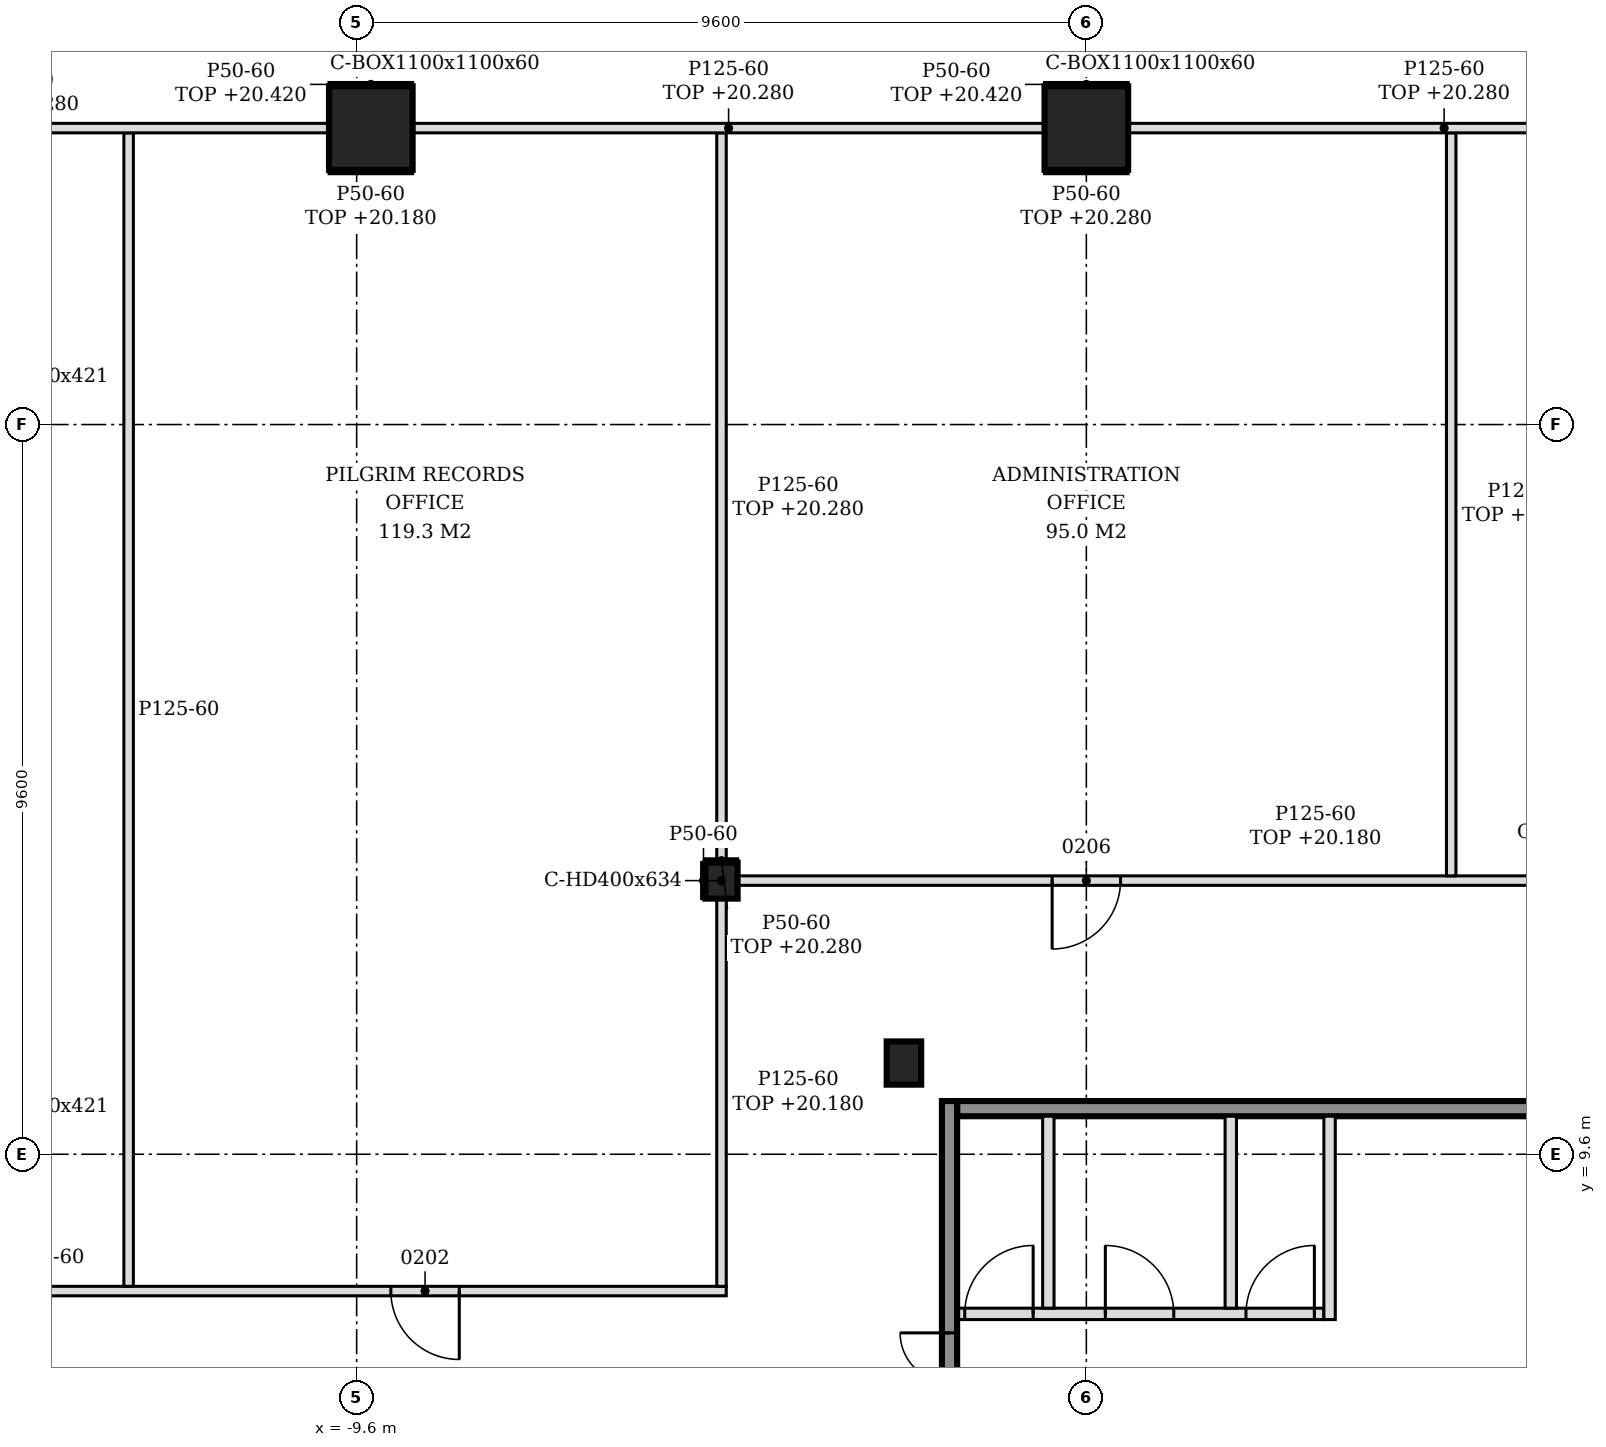
"""IFC4 building model, lengths in metres.
Left out: names, types, materials, properties, quantities, classifications, styles, units other than length and angle.
Written with IfcOpenShell. Run it as: python <this file> out.ifc"""

import sys

from ifc_helpers import new_model, si_unit, direction, frame, frame_2d, origin, origin_2d, place, context, subcontext, project, spatial, polyline, rectangle, hollow_rectangle, i_section, outline, extrude, element, fill, save


model = new_model("IFC4")
c1 = context("Model", 3, precision=1e-05, world=origin(), true_north=direction((0.0, 1.0)))
c2 = subcontext(c1, "Body", "Model", "MODEL_VIEW")
j1 = project(units=[si_unit("LENGTHUNIT", "METRE"), si_unit("PLANEANGLEUNIT", "RADIAN")], contexts=[c1])
p1 = place(None, origin())
s1 = spatial("IfcSite", under=j1, at=p1, CompositionType="ELEMENT")
p2 = place(p1, origin())
s2 = spatial("IfcBuilding", under=s1, at=p2, CompositionType="ELEMENT")
p3 = place(p2, frame((0.0, 0.0, 15.0)))
s3 = spatial("IfcBuildingStorey", under=s2, at=p3, CompositionType="ELEMENT", Elevation=15.0)
for number, where, z_axis, x_axis in (
    (1, (0.0, 23.1, -0.2), (0.0, 0.0, 1.0), (1.0, 0.0, 0.0)),
    (2, (-9.414, 23.1, -0.2), (0.0, 0.0, 1.0), (1.0, 0.0, 0.0)),
):
    element("IfcColumn", number, at=place(p3, frame(where, z_axis=z_axis, x_axis=x_axis)), inside=s3, PredefinedType="COLUMN", context=c2, shape_type="SweptSolid", body=[
        extrude(hollow_rectangle(XDim=1.1, YDim=1.1, WallThickness=0.06, at=origin_2d()), origin(), (0.0, 0.0, 1.0), 6.0),
    ])
p4 = place(p3, frame((-4.8, 13.2, -0.2), z_axis=(0.0, 0.0, 1.0), x_axis=(1.0, 0.0, 0.0)))
e3 = element("IfcColumn", 3, at=p4, inside=s3, PredefinedType="COLUMN", context=c2, shape_type="SweptSolid", body=[
    extrude(i_section(OverallWidth=0.424, OverallDepth=0.474, WebThickness=0.048, FlangeThickness=0.077, FilletRadius=0.015, at=origin_2d()), origin(), (0.0, 0.0, 1.0), 6.0),
])
p5 = place(p3, frame((-2.4, 10.8, -0.2), z_axis=(0.0, 0.0, 1.0), x_axis=(1.0, 0.0, 0.0)))
e4 = element("IfcColumn", 4, at=p5, inside=s3, PredefinedType="COLUMN", context=c2, shape_type="SweptSolid", body=[
    extrude(i_section(OverallWidth=0.454, OverallDepth=0.569, WebThickness=0.078, FlangeThickness=0.125, FilletRadius=0.015, at=origin_2d()), origin(), (0.0, 0.0, 1.0), 6.0),
])
p6 = place(p3, frame((-1.7, 7.5, 0.0), z_axis=(0.0, 0.0, 1.0), x_axis=(1.0, 0.0, 0.0)))
e5 = element("IfcWall", 5, at=p6, inside=s3, PredefinedType="PARTITIONING", context=c2, shape_type="SweptSolid", body=[
    extrude(rectangle(XDim=4.825, YDim=0.15, at=frame_2d((2.413, 0.0))), origin(), (0.0, 0.0, 1.0), 5.8),
])
p7 = place(p6, frame((0.1, 0.0, 0.0)))
e6 = element("IfcOpeningElement", 6, at=p7, cuts=e5, PredefinedType="OPENING", context=c2, shape_type="SweptSolid", body=[
    extrude(rectangle(XDim=0.9, YDim=2.1, at=frame_2d((0.45, 1.05))), frame((0.0, 0.085, 0.0), z_axis=(0.0, -1.0, 0.0), x_axis=(1.0, 0.0, 0.0)), (0.0, 0.0, 1.0), 0.17),
])
p8 = place(p6, frame((1.95, 0.0, 0.0)))
e7 = element("IfcOpeningElement", 7, at=p8, cuts=e5, PredefinedType="OPENING", context=c2, shape_type="SweptSolid", body=[
    extrude(rectangle(XDim=0.9, YDim=2.1, at=frame_2d((0.45, 1.05))), frame((0.0, 0.085, 0.0), z_axis=(0.0, -1.0, 0.0), x_axis=(1.0, 0.0, 0.0)), (0.0, 0.0, 1.0), 0.17),
])
p9 = place(p6, frame((3.8, 0.0, 0.0)))
e8 = element("IfcOpeningElement", 8, at=p9, cuts=e5, PredefinedType="OPENING", context=c2, shape_type="SweptSolid", body=[
    extrude(rectangle(XDim=0.9, YDim=2.1, at=frame_2d((0.45, 1.05))), frame((0.0, 0.085, 0.0), z_axis=(0.0, -1.0, 0.0), x_axis=(1.0, 0.0, 0.0)), (0.0, 0.0, 1.0), 0.17),
])
p10 = place(p3, frame((-1.7, 10.2, 0.0), z_axis=(0.0, 0.0, 1.0), x_axis=(1.0, 0.0, 0.0)))
e9 = element("IfcWall", 9, at=p10, inside=s3, PredefinedType="SOLIDWALL", context=c2, shape_type="SweptSolid", body=[
    extrude(rectangle(XDim=7.9, YDim=0.2, at=frame_2d((3.95, 0.0))), origin(), (0.0, 0.0, 1.0), 5.8),
])
p11 = place(p3, frame((-1.8, -5.5, 0.0), z_axis=(0.0, 0.0, 1.0), x_axis=(0.0, 1.0, 0.0)))
e10 = element("IfcWall", 10, at=p11, inside=s3, PredefinedType="SOLIDWALL", context=c2, shape_type="SweptSolid", body=[
    extrude(rectangle(XDim=15.8, YDim=0.2, at=frame_2d((7.9, 0.0))), origin(), (0.0, 0.0, 1.0), 5.8),
])
p12 = place(p11, frame((3.05, 0.0, 0.0)))
e11 = element("IfcOpeningElement", 11, at=p12, cuts=e10, PredefinedType="OPENING", context=c2, shape_type="SweptSolid", body=[
    extrude(rectangle(XDim=1.3, YDim=2.1, at=frame_2d((0.65, 1.05))), frame((0.0, 0.11, 0.0), z_axis=(0.0, -1.0, 0.0), x_axis=(1.0, 0.0, 0.0)), (0.0, 0.0, 1.0), 0.22),
])
p13 = place(p11, frame((11.45, 0.0, 0.0)))
e12 = element("IfcOpeningElement", 12, at=p13, cuts=e10, PredefinedType="OPENING", context=c2, shape_type="SweptSolid", body=[
    extrude(rectangle(XDim=1.3, YDim=2.1, at=frame_2d((0.65, 1.05))), frame((0.0, 0.11, 0.0), z_axis=(0.0, -1.0, 0.0), x_axis=(1.0, 0.0, 0.0)), (0.0, 0.0, 1.0), 0.22),
])
for number, where, z_axis, x_axis in (
    (13, (-0.5, 7.575, 0.0), (0.0, 0.0, 1.0), (0.0, 1.0, 0.0)),
    (14, (1.9, 7.575, 0.0), (0.0, 0.0, 1.0), (0.0, 1.0, 0.0)),
):
    element("IfcWall", number, at=place(p3, frame(where, z_axis=z_axis, x_axis=x_axis)), inside=s3, PredefinedType="PARTITIONING", context=c2, shape_type="SweptSolid", body=[
        extrude(rectangle(XDim=2.525, YDim=0.15, at=frame_2d((1.263, 0.0))), origin(), (0.0, 0.0, 1.0), 5.8),
    ])
p14 = place(p3, frame((3.2, 7.425, 0.0), z_axis=(0.0, 0.0, 1.0), x_axis=(0.0, 1.0, 0.0)))
e15 = element("IfcWall", 15, at=p14, inside=s3, PredefinedType="PARTITIONING", context=c2, shape_type="SweptSolid", body=[
    extrude(rectangle(XDim=2.675, YDim=0.15, at=frame_2d((1.337, 0.0))), origin(), (0.0, 0.0, 1.0), 5.8),
])
p15 = place(p3, frame((-23.938, 7.8, 0.0), z_axis=(0.0, 0.0, 1.0), x_axis=(1.0, 0.0, 0.0)))
e16 = element("IfcWall", 16, at=p15, inside=s3, PredefinedType="PARTITIONING", context=c2, shape_type="SweptSolid", body=[
    extrude(outline(polyline([(0.0, 0.0), (19.2, 0.0), (19.2, 5.18), (18.988, 5.18), (18.986, 5.8), (14.438, 5.8), (14.436, 5.28), (14.238, 5.28), (14.236, 5.8), (9.637, 5.8), (9.635, 5.28), (9.438, 5.28), (9.436, 5.8), (4.837, 5.8), (4.835, 5.28), (4.637, 5.28), (4.635, 5.8), (0.038, 5.8), (0.035, 5.28), (0.0, 5.28), (0.0, 0.0)])), frame((0.0, 0.062, 0.0), z_axis=(0.0, -1.0, 0.0), x_axis=(1.0, 0.0, 0.0)), (0.0, 0.0, 1.0), 0.125),
])
p16 = place(p15, frame((4.738, 0.0, 0.0)))
e17 = element("IfcOpeningElement", 17, at=p16, cuts=e16, PredefinedType="OPENING", context=c2, shape_type="SweptSolid", body=[
    extrude(rectangle(XDim=1.8, YDim=2.1, at=frame_2d((0.9, 1.05))), frame((0.0, 0.073, 0.0), z_axis=(0.0, -1.0, 0.0), x_axis=(1.0, 0.0, 0.0)), (0.0, 0.0, 1.0), 0.145),
])
p17 = place(p15, frame((14.788, 0.0, 0.0)))
e18 = element("IfcOpeningElement", 18, at=p17, cuts=e16, PredefinedType="OPENING", context=c2, shape_type="SweptSolid", body=[
    extrude(rectangle(XDim=0.9, YDim=2.1, at=frame_2d((0.45, 1.05))), frame((0.0, 0.073, 0.0), z_axis=(0.0, -1.0, 0.0), x_axis=(1.0, 0.0, 0.0)), (0.0, 0.0, 1.0), 0.145),
])
p18 = place(p3, frame((-12.6, 7.863, 0.0), z_axis=(0.0, 0.0, 1.0), x_axis=(0.0, 1.0, 0.0)))
e19 = element("IfcWall", 19, at=p18, inside=s3, PredefinedType="PARTITIONING", context=c2, shape_type="SweptSolid", body=[
    extrude(outline(polyline([(0.0, 0.0), (15.175, 0.0), (15.175, 5.28), (15.087, 5.28), (15.085, 5.8), (1.887, 5.8), (1.885, 5.28), (1.587, 5.28), (1.585, 5.8), (0.0, 5.8), (0.0, 0.0)])), frame((0.0, 0.062, 0.0), z_axis=(0.0, -1.0, 0.0), x_axis=(1.0, 0.0, 0.0)), (0.0, 0.0, 1.0), 0.125),
])
p19 = place(p3, frame((-4.8, 7.863, 0.0), z_axis=(0.0, 0.0, 1.0), x_axis=(0.0, 1.0, 0.0)))
e20 = element("IfcWall", 20, at=p19, inside=s3, PredefinedType="PARTITIONING", context=c2, shape_type="SweptSolid", body=[
    extrude(rectangle(XDim=5.1, YDim=0.125, at=frame_2d((2.55, 0.0))), origin(), (0.0, 0.0, 1.0), 5.18),
])
p20 = place(p3, frame((-4.588, 13.2, 0.0), z_axis=(0.0, 0.0, 1.0), x_axis=(1.0, 0.0, 0.0)))
e21 = element("IfcWall", 21, at=p20, inside=s3, PredefinedType="PARTITIONING", context=c2, shape_type="SweptSolid", body=[
    extrude(rectangle(XDim=11.576, YDim=0.125, at=frame_2d((5.788, 0.0))), origin(), (0.0, 0.0, 1.0), 5.18),
])
p21 = place(p20, frame((4.138, 0.0, 0.0)))
e22 = element("IfcOpeningElement", 22, at=p21, cuts=e21, PredefinedType="OPENING", context=c2, shape_type="SweptSolid", body=[
    extrude(rectangle(XDim=0.9, YDim=2.1, at=frame_2d((0.45, 1.05))), frame((0.0, 0.073, 0.0), z_axis=(0.0, -1.0, 0.0), x_axis=(1.0, 0.0, 0.0)), (0.0, 0.0, 1.0), 0.145),
])
p22 = place(p3, frame((4.8, 13.262, 0.0), z_axis=(0.0, 0.0, 1.0), x_axis=(0.0, 1.0, 0.0)))
e23 = element("IfcWall", 23, at=p22, inside=s3, PredefinedType="PARTITIONING", context=c2, shape_type="SweptSolid", body=[
    extrude(outline(polyline([(0.0, 0.0), (9.775, 0.0), (9.775, 5.28), (0.087, 5.28), (0.085, 5.18), (0.0, 5.18), (0.0, 0.0)])), frame((0.0, 0.062, 0.0), z_axis=(0.0, -1.0, 0.0), x_axis=(1.0, 0.0, 0.0)), (0.0, 0.0, 1.0), 0.125),
])
p23 = place(p3, frame((-4.8, 13.437, 0.0), z_axis=(0.0, 0.0, 1.0), x_axis=(0.0, 1.0, 0.0)))
e24 = element("IfcWall", 24, at=p23, inside=s3, PredefinedType="PARTITIONING", context=c2, shape_type="SweptSolid", body=[
    extrude(rectangle(XDim=9.601, YDim=0.125, at=frame_2d((4.8, 0.0))), origin(), (0.0, 0.0, 1.0), 5.28),
])
for number, where, z_axis, x_axis in (
    (25, (-18.277, 23.1, 0.0), (0.0, 0.0, 1.0), (1.0, 0.0, 0.0)),
    (26, (-8.864, 23.1, 0.0), (0.0, 0.0, 1.0), (1.0, 0.0, 0.0)),
    (27, (0.55, 23.1, 0.0), (0.0, 0.0, 1.0), (1.0, 0.0, 0.0)),
):
    element("IfcWall", number, at=place(p3, frame(where, z_axis=z_axis, x_axis=x_axis)), inside=s3, PredefinedType="PARTITIONING", context=c2, shape_type="SweptSolid", body=[
        extrude(rectangle(XDim=8.313, YDim=0.125, at=frame_2d((4.157, 0.0))), origin(), (0.0, 0.0, 1.0), 5.28),
    ])
p24 = place(p3, frame((-5.037, 12.963, 0.0), z_axis=(0.0, 0.0, 1.0), x_axis=(0.0, 1.0, 0.0)))
e28 = element("IfcWall", 28, at=p24, inside=s3, PredefinedType="PARTITIONING", context=c2, shape_type="SweptSolid", body=[
    extrude(rectangle(XDim=0.474, YDim=0.05, at=frame_2d((0.237, 0.0))), origin(), (0.0, 0.0, 1.0), 5.8),
])
p25 = place(p3, frame((-5.012, 13.462, 0.0), z_axis=(0.0, 0.0, 1.0), x_axis=(1.0, 0.0, 0.0)))
e29 = element("IfcWall", 29, at=p25, inside=s3, PredefinedType="PARTITIONING", context=c2, shape_type="SweptSolid", body=[
    extrude(rectangle(XDim=0.424, YDim=0.05, at=frame_2d((0.212, 0.0))), origin(), (0.0, 0.0, 1.0), 5.28),
])
p26 = place(p3, frame((-9.964, 22.525, 0.0), z_axis=(0.0, 0.0, 1.0), x_axis=(1.0, 0.0, 0.0)))
e30 = element("IfcWall", 30, at=p26, inside=s3, PredefinedType="PARTITIONING", context=c2, shape_type="SweptSolid", body=[
    extrude(rectangle(XDim=1.1, YDim=0.05, at=frame_2d((0.55, 0.0))), origin(), (0.0, 0.0, 1.0), 5.18),
])
p27 = place(p3, frame((-9.964, 23.675, 0.0), z_axis=(0.0, 0.0, 1.0), x_axis=(1.0, 0.0, 0.0)))
e31 = element("IfcWall", 31, at=p27, inside=s3, PredefinedType="PARTITIONING", context=c2, shape_type="SweptSolid", body=[
    extrude(rectangle(XDim=1.1, YDim=0.05, at=frame_2d((0.55, 0.0))), origin(), (0.0, 0.0, 1.0), 5.42),
])
p28 = place(p3, frame((-0.55, 22.525, 0.0), z_axis=(0.0, 0.0, 1.0), x_axis=(1.0, 0.0, 0.0)))
e32 = element("IfcWall", 32, at=p28, inside=s3, PredefinedType="PARTITIONING", context=c2, shape_type="SweptSolid", body=[
    extrude(rectangle(XDim=1.1, YDim=0.05, at=frame_2d((0.55, 0.0))), origin(), (0.0, 0.0, 1.0), 5.28),
])
p29 = place(p3, frame((-0.55, 23.675, 0.0), z_axis=(0.0, 0.0, 1.0), x_axis=(1.0, 0.0, 0.0)))
e33 = element("IfcWall", 33, at=p29, inside=s3, PredefinedType="PARTITIONING", context=c2, shape_type="SweptSolid", body=[
    extrude(rectangle(XDim=1.1, YDim=0.05, at=frame_2d((0.55, 0.0))), origin(), (0.0, 0.0, 1.0), 5.42),
])
p30 = place(p13, origin())
e34 = element("IfcDoor", 34, at=p30, inside=s3, OperationType="DOUBLE_DOOR_SINGLE_SWING", PredefinedType="DOOR", context=c2, shape_type="SweptSolid", body=[
    extrude(rectangle(XDim=1.3, YDim=2.1, at=frame_2d((0.65, 1.05))), frame((0.0, 0.025, 0.0), z_axis=(0.0, -1.0, 0.0), x_axis=(1.0, 0.0, 0.0)), (0.0, 0.0, 1.0), 0.05),
])
fill(e12, e34)
p31 = place(p7, origin())
e35 = element("IfcDoor", 35, at=p31, inside=s3, OperationType="SINGLE_SWING_RIGHT", PredefinedType="DOOR", context=c2, shape_type="SweptSolid", body=[
    extrude(rectangle(XDim=0.9, YDim=2.1, at=frame_2d((0.45, 1.05))), frame((0.0, 0.025, 0.0), z_axis=(0.0, -1.0, 0.0), x_axis=(1.0, 0.0, 0.0)), (0.0, 0.0, 1.0), 0.05),
])
fill(e6, e35)
p32 = place(p8, origin())
e36 = element("IfcDoor", 36, at=p32, inside=s3, OperationType="SINGLE_SWING_LEFT", PredefinedType="DOOR", context=c2, shape_type="SweptSolid", body=[
    extrude(rectangle(XDim=0.9, YDim=2.1, at=frame_2d((0.45, 1.05))), frame((0.0, 0.025, 0.0), z_axis=(0.0, -1.0, 0.0), x_axis=(1.0, 0.0, 0.0)), (0.0, 0.0, 1.0), 0.05),
])
fill(e7, e36)
p33 = place(p9, origin())
e37 = element("IfcDoor", 37, at=p33, inside=s3, OperationType="SINGLE_SWING_RIGHT", PredefinedType="DOOR", context=c2, shape_type="SweptSolid", body=[
    extrude(rectangle(XDim=0.9, YDim=2.1, at=frame_2d((0.45, 1.05))), frame((0.0, 0.025, 0.0), z_axis=(0.0, -1.0, 0.0), x_axis=(1.0, 0.0, 0.0)), (0.0, 0.0, 1.0), 0.05),
])
fill(e8, e37)
p34 = place(p17, frame((0.9, 0.0, 0.0), z_axis=(0.0, 0.0, 1.0), x_axis=(-1.0, 0.0, 0.0)))
e38 = element("IfcDoor", 38, at=p34, inside=s3, OperationType="SINGLE_SWING_LEFT", PredefinedType="DOOR", context=c2, shape_type="SweptSolid", body=[
    extrude(rectangle(XDim=0.9, YDim=2.1, at=frame_2d((0.45, 1.05))), frame((0.0, 0.025, 0.0), z_axis=(0.0, -1.0, 0.0), x_axis=(1.0, 0.0, 0.0)), (0.0, 0.0, 1.0), 0.05),
])
fill(e18, e38)
p35 = place(p21, frame((0.9, 0.0, 0.0), z_axis=(0.0, 0.0, 1.0), x_axis=(-1.0, 0.0, 0.0)))
e39 = element("IfcDoor", 39, at=p35, inside=s3, OperationType="SINGLE_SWING_RIGHT", PredefinedType="DOOR", context=c2, shape_type="SweptSolid", body=[
    extrude(rectangle(XDim=0.9, YDim=2.1, at=frame_2d((0.45, 1.05))), frame((0.0, 0.025, 0.0), z_axis=(0.0, -1.0, 0.0), x_axis=(1.0, 0.0, 0.0)), (0.0, 0.0, 1.0), 0.05),
])
fill(e22, e39)
save(model, sys.argv[1])
